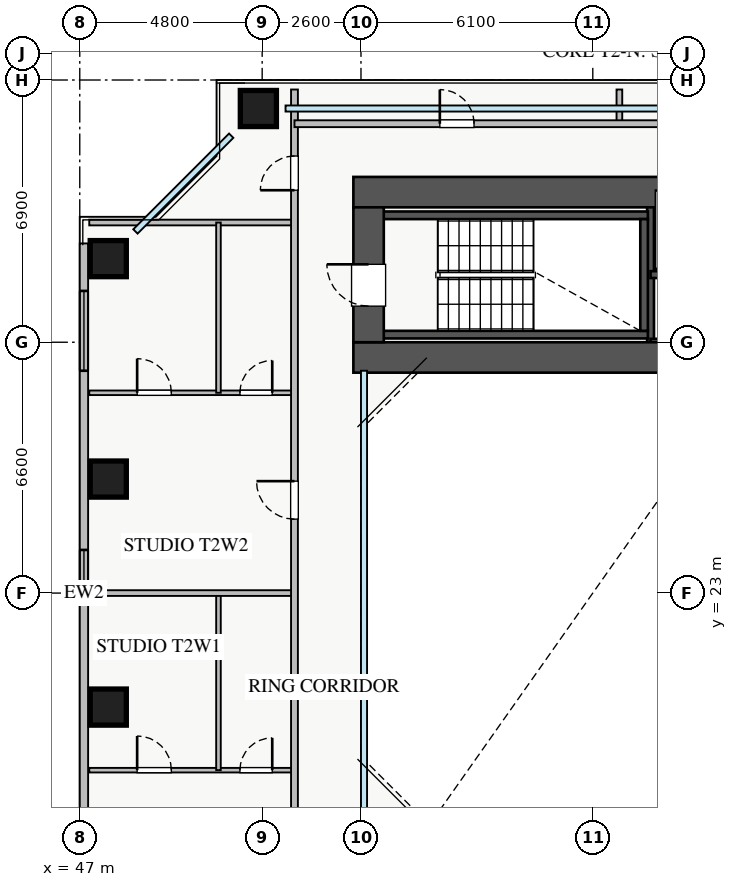
"""IFC4 building model, lengths in metres.
Left out: names, types, materials, properties, quantities, classifications, styles, units other than length and angle.
Written with IfcOpenShell. Run it as: python <this file> out.ifc"""

import sys

from ifc_helpers import new_model, si_unit, direction, frame, frame_2d, origin, origin_2d, place, context, subcontext, project, spatial, rectangle, extrude, source, transform, mapped, element, fill, save


model = new_model("IFC4")
c1 = context("Model", 3, precision=1e-05, world=origin(), true_north=direction((0.0, 1.0)))
c2 = subcontext(c1, "Body", "Model", "MODEL_VIEW")
j1 = project(units=[si_unit("LENGTHUNIT", "METRE"), si_unit("PLANEANGLEUNIT", "RADIAN")], contexts=[c1])
p1 = place(None, origin())
s1 = spatial("IfcSite", under=j1, at=p1, CompositionType="ELEMENT")
p2 = place(p1, origin())
s2 = spatial("IfcBuilding", under=s1, at=p2, CompositionType="ELEMENT")
p3 = place(p2, frame((0.0, 0.0, 36.0)))
s3 = spatial("IfcBuildingStorey", under=s2, at=p3, CompositionType="ELEMENT", Elevation=36.0)
p4 = place(p3, frame((62.02, 29.6, 0.0), z_axis=(0.0, 0.0, 1.0), x_axis=(0.0, 1.0, 0.0)))
e1 = element("IfcWall", 1, at=p4, inside=s3, PredefinedType="SHEAR", context=c2, shape_type="SweptSolid", body=[
    extrude(rectangle(XDim=3.95, YDim=0.18, at=frame_2d((1.975, 0.0))), origin(), (0.0, 0.0, 1.0), 3.07),
])
for number, where, z_axis, x_axis in (
    (2, (62.02, 31.38, 0.0), (0.0, 0.0, 1.0), (1.0, 0.0, 0.0)),
    (3, (62.02, 29.6, 0.0), (0.0, 0.0, 1.0), (1.0, 0.0, 0.0)),
):
    element("IfcWall", number, at=place(p3, frame(where, z_axis=z_axis, x_axis=x_axis)), inside=s3, PredefinedType="SHEAR", context=c2, shape_type="SweptSolid", body=[
        extrude(rectangle(XDim=1.86, YDim=0.18, at=frame_2d((0.93, 0.0))), origin(), (0.0, 0.0, 1.0), 3.07),
    ])
for number, where, z_axis, x_axis in (
    (4, (54.8, 29.8, 0.0), (0.0, 0.0, 1.0), (1.0, 0.0, 0.0)),
    (5, (54.8, 32.94, 0.0), (0.0, 0.0, 1.0), (1.0, 0.0, 0.0)),
):
    element("IfcWall", number, at=place(p3, frame(where, z_axis=z_axis, x_axis=x_axis)), inside=s3, PredefinedType="SHEAR", context=c2, shape_type="SweptSolid", body=[
        extrude(rectangle(XDim=7.15, YDim=0.2, at=frame_2d((3.575, 0.0))), origin(), (0.0, 0.0, 1.0), 3.25),
    ])
p5 = place(p3, frame((61.85, 29.9, 0.0), z_axis=(0.0, 0.0, 1.0), x_axis=(0.0, 1.0, 0.0)))
e6 = element("IfcWall", 6, at=p5, inside=s3, PredefinedType="SHEAR", context=c2, shape_type="SweptSolid", body=[
    extrude(rectangle(XDim=2.94, YDim=0.2, at=frame_2d((1.47, 0.0))), origin(), (0.0, 0.0, 1.0), 3.25),
])
p6 = place(p3, frame((54.2, 29.2, 0.0), z_axis=(0.0, 0.0, 1.0), x_axis=(1.0, 0.0, 0.0)))
e7 = element("IfcWall", 7, at=p6, inside=s3, PredefinedType="SHEAR", context=c2, shape_type="SweptSolid", body=[
    extrude(rectangle(XDim=12.6, YDim=0.8, at=frame_2d((6.3, 0.0))), origin(), (0.0, 0.0, 1.0), 3.25),
])
p7 = place(p3, frame((54.2, 33.55, 0.0), z_axis=(0.0, 0.0, 1.0), x_axis=(1.0, 0.0, 0.0)))
e8 = element("IfcWall", 8, at=p7, inside=s3, PredefinedType="SHEAR", context=c2, shape_type="SweptSolid", body=[
    extrude(rectangle(XDim=12.6, YDim=0.8, at=frame_2d((6.3, 0.0))), origin(), (0.0, 0.0, 1.0), 3.25),
])
p8 = place(p7, frame((8.2, 0.0, 0.0)))
e9 = element("IfcOpeningElement", 9, at=p8, cuts=e8, PredefinedType="OPENING", context=c2, shape_type="SweptSolid", body=[
    extrude(rectangle(XDim=1.1, YDim=2.05, at=frame_2d((0.55, 1.025))), frame((0.0, 0.41, 0.0), z_axis=(0.0, -1.0, 0.0), x_axis=(1.0, 0.0, 0.0)), (0.0, 0.0, 1.0), 0.82),
])
p9 = place(p3, frame((54.6, 29.6, 0.0), z_axis=(0.0, 0.0, 1.0), x_axis=(0.0, 1.0, 0.0)))
e10 = element("IfcWall", 10, at=p9, inside=s3, PredefinedType="SHEAR", context=c2, shape_type="SweptSolid", body=[
    extrude(rectangle(XDim=3.55, YDim=0.8, at=frame_2d((1.775, 0.0))), origin(), (0.0, 0.0, 1.0), 3.25),
])
p10 = place(p9, frame((0.95, 0.0, 0.0)))
e11 = element("IfcOpeningElement", 11, at=p10, cuts=e10, PredefinedType="OPENING", context=c2, shape_type="SweptSolid", body=[
    extrude(rectangle(XDim=1.1, YDim=2.05, at=frame_2d((0.55, 1.025))), frame((0.0, 0.41, 0.0), z_axis=(0.0, -1.0, 0.0), x_axis=(1.0, 0.0, 0.0)), (0.0, 0.0, 1.0), 0.82),
])
m1 = source(origin(), c2, "Body", "SweptSolid", [
    extrude(rectangle(XDim=0.95, YDim=0.95, at=origin_2d()), origin(), (0.0, 0.0, 1.0), 3.25),
])
for number, where, z_axis, x_axis in (
    (12, (51.7, 35.75, 0.0), (0.0, 0.0, 1.0), (1.0, 0.0, 0.0)),
    (13, (47.75, 20.0, 0.0), (0.0, 0.0, 1.0), (1.0, 0.0, 0.0)),
    (14, (47.75, 26.0, 0.0), (0.0, 0.0, 1.0), (1.0, 0.0, 0.0)),
    (15, (47.75, 31.8, 0.0), (0.0, 0.0, 1.0), (1.0, 0.0, 0.0)),
):
    element("IfcColumn", number, at=place(p3, frame(where, z_axis=z_axis, x_axis=x_axis)), inside=s3, PredefinedType="COLUMN", context=c2, shape_type="MappedRepresentation", body=[
        mapped(m1, transform((0.0, 0.0, 0.0), x_axis=(1.0, 0.0, 0.0), y_axis=(0.0, 1.0, 0.0), z_axis=(0.0, 0.0, 1.0), scale=1.0)),
    ])
p11 = place(p3, frame((47.11, 13.8, 0.0), z_axis=(0.0, 0.0, 1.0), x_axis=(0.0, 1.0, 0.0)))
e16 = element("IfcWall", 16, at=p11, inside=s3, PredefinedType="STANDARD", context=c2, shape_type="SweptSolid", body=[
    extrude(rectangle(XDim=18.4, YDim=0.22, at=frame_2d((9.2, 0.0))), origin(), (0.0, 0.0, 1.0), 2.61),
])
p12 = place(p11, frame((1.1, 0.0, 0.9)))
e17 = element("IfcOpeningElement", 17, at=p12, cuts=e16, PredefinedType="OPENING", context=c2, shape_type="SweptSolid", body=[
    extrude(rectangle(XDim=2.4, YDim=1.48, at=frame_2d((1.2, 0.74))), frame((0.0, 0.12, 0.0), z_axis=(0.0, -1.0, 0.0), x_axis=(1.0, 0.0, 0.0)), (0.0, 0.0, 1.0), 0.24),
])
p13 = place(p11, frame((15.05, 0.0, 0.9)))
e18 = element("IfcOpeningElement", 18, at=p13, cuts=e16, PredefinedType="OPENING", context=c2, shape_type="SweptSolid", body=[
    extrude(rectangle(XDim=2.1, YDim=1.48, at=frame_2d((1.05, 0.74))), frame((0.0, 0.12, 0.0), z_axis=(0.0, -1.0, 0.0), x_axis=(1.0, 0.0, 0.0)), (0.0, 0.0, 1.0), 0.24),
])
p14 = place(p11, frame((9.435, 0.0, 0.9)))
e19 = element("IfcOpeningElement", 19, at=p14, cuts=e16, PredefinedType="OPENING", context=c2, shape_type="SweptSolid", body=[
    extrude(rectangle(XDim=0.9, YDim=1.2, at=frame_2d((0.45, 0.6))), frame((0.0, 0.12, 0.0), z_axis=(0.0, -1.0, 0.0), x_axis=(1.0, 0.0, 0.0)), (0.0, 0.0, 1.0), 0.24),
])
p15 = place(p3, frame((47.25, 32.75, 0.0), z_axis=(0.0, 0.0, 1.0), x_axis=(1.0, 0.0, 0.0)))
e20 = element("IfcWall", 20, at=p15, inside=s3, PredefinedType="PARTITIONING", context=c2, shape_type="SweptSolid", body=[
    extrude(rectangle(XDim=5.4, YDim=0.15, at=frame_2d((2.7, 0.0))), origin(), (0.0, 0.0, 1.0), 3.07),
])
p16 = place(p3, frame((47.25, 18.34, 0.0), z_axis=(0.0, 0.0, 1.0), x_axis=(1.0, 0.0, 0.0)))
e21 = element("IfcWall", 21, at=p16, inside=s3, PredefinedType="PLUMBINGWALL", context=c2, shape_type="SweptSolid", body=[
    extrude(rectangle(XDim=5.4, YDim=0.12, at=frame_2d((2.7, 0.0))), origin(), (0.0, 0.0, 1.0), 2.715),
])
p17 = place(p16, frame((1.26, 0.0, 0.0)))
e22 = element("IfcOpeningElement", 22, at=p17, cuts=e21, PredefinedType="OPENING", context=c2, shape_type="SweptSolid", body=[
    extrude(rectangle(XDim=0.9, YDim=2.05, at=frame_2d((0.45, 1.025))), frame((0.0, 0.07, 0.0), z_axis=(0.0, -1.0, 0.0), x_axis=(1.0, 0.0, 0.0)), (0.0, 0.0, 1.0), 0.14),
])
p18 = place(p16, frame((3.965, 0.0, 0.0)))
e23 = element("IfcOpeningElement", 23, at=p18, cuts=e21, PredefinedType="OPENING", context=c2, shape_type="SweptSolid", body=[
    extrude(rectangle(XDim=0.85, YDim=2.05, at=frame_2d((0.425, 1.025))), frame((0.0, 0.07, 0.0), z_axis=(0.0, -1.0, 0.0), x_axis=(1.0, 0.0, 0.0)), (0.0, 0.0, 1.0), 0.14),
])
p19 = place(p3, frame((50.65, 18.34, 0.0), z_axis=(0.0, 0.0, 1.0), x_axis=(0.0, 1.0, 0.0)))
e24 = element("IfcWall", 24, at=p19, inside=s3, PredefinedType="PLUMBINGWALL", context=c2, shape_type="SweptSolid", body=[
    extrude(rectangle(XDim=4.66, YDim=0.12, at=frame_2d((2.33, 0.0))), origin(), (0.0, 0.0, 1.0), 3.07),
])
p20 = place(p3, frame((47.25, 28.27, 0.0), z_axis=(0.0, 0.0, 1.0), x_axis=(1.0, 0.0, 0.0)))
e25 = element("IfcWall", 25, at=p20, inside=s3, PredefinedType="PLUMBINGWALL", context=c2, shape_type="SweptSolid", body=[
    extrude(rectangle(XDim=5.4, YDim=0.12, at=frame_2d((2.7, 0.0))), origin(), (0.0, 0.0, 1.0), 3.07),
])
p21 = place(p20, frame((1.26, 0.0, 0.0)))
e26 = element("IfcOpeningElement", 26, at=p21, cuts=e25, PredefinedType="OPENING", context=c2, shape_type="SweptSolid", body=[
    extrude(rectangle(XDim=0.9, YDim=2.05, at=frame_2d((0.45, 1.025))), frame((0.0, 0.07, 0.0), z_axis=(0.0, -1.0, 0.0), x_axis=(1.0, 0.0, 0.0)), (0.0, 0.0, 1.0), 0.14),
])
p22 = place(p20, frame((3.965, 0.0, 0.0)))
e27 = element("IfcOpeningElement", 27, at=p22, cuts=e25, PredefinedType="OPENING", context=c2, shape_type="SweptSolid", body=[
    extrude(rectangle(XDim=0.85, YDim=2.05, at=frame_2d((0.425, 1.025))), frame((0.0, 0.07, 0.0), z_axis=(0.0, -1.0, 0.0), x_axis=(1.0, 0.0, 0.0)), (0.0, 0.0, 1.0), 0.14),
])
p23 = place(p3, frame((50.65, 28.27, 0.0), z_axis=(0.0, 0.0, 1.0), x_axis=(0.0, 1.0, 0.0)))
e28 = element("IfcWall", 28, at=p23, inside=s3, PredefinedType="PLUMBINGWALL", context=c2, shape_type="SweptSolid", body=[
    extrude(rectangle(XDim=4.48, YDim=0.12, at=frame_2d((2.24, 0.0))), origin(), (0.0, 0.0, 1.0), 3.07),
])
p24 = place(p3, frame((47.25, 23.0, 0.0), z_axis=(0.0, 0.0, 1.0), x_axis=(1.0, 0.0, 0.0)))
e29 = element("IfcWall", 29, at=p24, inside=s3, PredefinedType="PARTITIONING", context=c2, shape_type="SweptSolid", body=[
    extrude(rectangle(XDim=5.4, YDim=0.15, at=frame_2d((2.7, 0.0))), origin(), (0.0, 0.0, 1.0), 2.715),
])
p25 = place(p3, frame((52.65, 9.75, 0.0), z_axis=(0.0, 0.0, 1.0), x_axis=(0.0, 1.0, 0.0)))
e30 = element("IfcWall", 30, at=p25, inside=s3, PredefinedType="PARTITIONING", context=c2, shape_type="SweptSolid", body=[
    extrude(rectangle(XDim=26.5, YDim=0.18, at=frame_2d((13.25, 0.0))), origin(), (0.0, 0.0, 1.0), 3.07),
])
p26 = place(p25, frame((23.85, 0.0, 0.0)))
e31 = element("IfcOpeningElement", 31, at=p26, cuts=e30, PredefinedType="OPENING", context=c2, shape_type="SweptSolid", body=[
    extrude(rectangle(XDim=0.9, YDim=2.05, at=frame_2d((0.45, 1.025))), frame((0.0, 0.1, 0.0), z_axis=(0.0, -1.0, 0.0), x_axis=(1.0, 0.0, 0.0)), (0.0, 0.0, 1.0), 0.2),
])
p27 = place(p25, frame((1.75, 0.0, 0.0)))
e32 = element("IfcOpeningElement", 32, at=p27, cuts=e30, PredefinedType="OPENING", context=c2, shape_type="SweptSolid", body=[
    extrude(rectangle(XDim=0.9, YDim=2.05, at=frame_2d((0.45, 1.025))), frame((0.0, 0.1, 0.0), z_axis=(0.0, -1.0, 0.0), x_axis=(1.0, 0.0, 0.0)), (0.0, 0.0, 1.0), 0.2),
])
p28 = place(p25, frame((5.355, 0.0, 0.0)))
e33 = element("IfcOpeningElement", 33, at=p28, cuts=e30, PredefinedType="OPENING", context=c2, shape_type="SweptSolid", body=[
    extrude(rectangle(XDim=1.0, YDim=2.05, at=frame_2d((0.5, 1.025))), frame((0.0, 0.1, 0.0), z_axis=(0.0, -1.0, 0.0), x_axis=(1.0, 0.0, 0.0)), (0.0, 0.0, 1.0), 0.2),
])
p29 = place(p25, frame((15.195, 0.0, 0.0)))
e34 = element("IfcOpeningElement", 34, at=p29, cuts=e30, PredefinedType="OPENING", context=c2, shape_type="SweptSolid", body=[
    extrude(rectangle(XDim=1.0, YDim=2.05, at=frame_2d((0.5, 1.025))), frame((0.0, 0.1, 0.0), z_axis=(0.0, -1.0, 0.0), x_axis=(1.0, 0.0, 0.0)), (0.0, 0.0, 1.0), 0.2),
])
p30 = place(p3, frame((61.2, 35.35, 0.0), z_axis=(0.0, 0.0, 1.0), x_axis=(0.0, 1.0, 0.0)))
e35 = element("IfcWall", 35, at=p30, inside=s3, PredefinedType="PARTITIONING", context=c2, shape_type="SweptSolid", body=[
    extrude(rectangle(XDim=0.9, YDim=0.15, at=frame_2d((0.45, 0.0))), origin(), (0.0, 0.0, 1.0), 3.07),
])
p31 = place(p3, frame((52.65, 35.35, 0.0), z_axis=(0.0, 0.0, 1.0), x_axis=(1.0, 0.0, 0.0)))
e36 = element("IfcWall", 36, at=p31, inside=s3, PredefinedType="PARTITIONING", context=c2, shape_type="SweptSolid", body=[
    extrude(rectangle(XDim=17.0, YDim=0.18, at=frame_2d((8.5, 0.0))), origin(), (0.0, 0.0, 1.0), 3.07),
])
p32 = place(p31, frame((3.825, 0.0, 0.0)))
e37 = element("IfcOpeningElement", 37, at=p32, cuts=e36, PredefinedType="OPENING", context=c2, shape_type="SweptSolid", body=[
    extrude(rectangle(XDim=0.9, YDim=2.05, at=frame_2d((0.45, 1.025))), frame((0.0, 0.1, 0.0), z_axis=(0.0, -1.0, 0.0), x_axis=(1.0, 0.0, 0.0)), (0.0, 0.0, 1.0), 0.2),
])
p33 = place(p31, frame((12.325, 0.0, 0.0)))
e38 = element("IfcOpeningElement", 38, at=p33, cuts=e36, PredefinedType="OPENING", context=c2, shape_type="SweptSolid", body=[
    extrude(rectangle(XDim=0.9, YDim=2.05, at=frame_2d((0.45, 1.025))), frame((0.0, 0.1, 0.0), z_axis=(0.0, -1.0, 0.0), x_axis=(1.0, 0.0, 0.0)), (0.0, 0.0, 1.0), 0.2),
])
m2 = source(origin(), c2, "Body", "SweptSolid", [
    extrude(rectangle(XDim=2.1, YDim=1.48, at=frame_2d((1.05, 0.74))), frame((0.0, 0.03, 0.0), z_axis=(0.0, -1.0, 0.0), x_axis=(1.0, 0.0, 0.0)), (0.0, 0.0, 1.0), 0.06),
])
p34 = place(p13, origin())
e39 = element("IfcWindow", 39, at=p34, inside=s3, PartitioningType="TRIPLE_PANEL_VERTICAL", PredefinedType="WINDOW", context=c2, shape_type="MappedRepresentation", body=[
    mapped(m2, transform((0.0, 0.0, 0.0), x_axis=(1.0, 0.0, 0.0), y_axis=(0.0, 1.0, 0.0), z_axis=(0.0, 0.0, 1.0), scale=1.0)),
])
fill(e18, e39)
m3 = source(origin(), c2, "Body", "SweptSolid", [
    extrude(rectangle(XDim=1.1, YDim=2.05, at=frame_2d((0.55, 1.025))), frame((0.0, 0.025, 0.0), z_axis=(0.0, -1.0, 0.0), x_axis=(1.0, 0.0, 0.0)), (0.0, 0.0, 1.0), 0.05),
])
p35 = place(p10, origin())
e40 = element("IfcDoor", 40, at=p35, inside=s3, OperationType="SINGLE_SWING_RIGHT", PredefinedType="DOOR", context=c2, shape_type="MappedRepresentation", body=[
    mapped(m3, transform((0.0, 0.0, 0.0), x_axis=(1.0, 0.0, 0.0), y_axis=(0.0, 1.0, 0.0), z_axis=(0.0, 0.0, 1.0), scale=1.0)),
])
fill(e11, e40)
m4 = source(origin(), c2, "Body", "SweptSolid", [
    extrude(rectangle(XDim=0.9, YDim=2.05, at=frame_2d((0.45, 1.025))), frame((0.0, 0.025, 0.0), z_axis=(0.0, -1.0, 0.0), x_axis=(1.0, 0.0, 0.0)), (0.0, 0.0, 1.0), 0.05),
])
p36 = place(p17, origin())
e41 = element("IfcDoor", 41, at=p36, inside=s3, OperationType="SINGLE_SWING_LEFT", PredefinedType="DOOR", context=c2, shape_type="MappedRepresentation", body=[
    mapped(m4, transform((0.0, 0.0, 0.0), x_axis=(1.0, 0.0, 0.0), y_axis=(0.0, 1.0, 0.0), z_axis=(0.0, 0.0, 1.0), scale=1.0)),
])
fill(e22, e41)
m5 = source(origin(), c2, "Body", "SweptSolid", [
    extrude(rectangle(XDim=0.85, YDim=2.05, at=frame_2d((0.425, 1.025))), frame((0.0, 0.025, 0.0), z_axis=(0.0, -1.0, 0.0), x_axis=(1.0, 0.0, 0.0)), (0.0, 0.0, 1.0), 0.05),
])
p37 = place(p18, origin())
e42 = element("IfcDoor", 42, at=p37, inside=s3, OperationType="SINGLE_SWING_RIGHT", PredefinedType="DOOR", context=c2, shape_type="MappedRepresentation", body=[
    mapped(m5, transform((0.0, 0.0, 0.0), x_axis=(1.0, 0.0, 0.0), y_axis=(0.0, 1.0, 0.0), z_axis=(0.0, 0.0, 1.0), scale=1.0)),
])
fill(e23, e42)
p38 = place(p21, origin())
e43 = element("IfcDoor", 43, at=p38, inside=s3, OperationType="SINGLE_SWING_LEFT", PredefinedType="DOOR", context=c2, shape_type="MappedRepresentation", body=[
    mapped(m4, transform((0.0, 0.0, 0.0), x_axis=(1.0, 0.0, 0.0), y_axis=(0.0, 1.0, 0.0), z_axis=(0.0, 0.0, 1.0), scale=1.0)),
])
fill(e26, e43)
p39 = place(p22, origin())
e44 = element("IfcDoor", 44, at=p39, inside=s3, OperationType="SINGLE_SWING_RIGHT", PredefinedType="DOOR", context=c2, shape_type="MappedRepresentation", body=[
    mapped(m5, transform((0.0, 0.0, 0.0), x_axis=(1.0, 0.0, 0.0), y_axis=(0.0, 1.0, 0.0), z_axis=(0.0, 0.0, 1.0), scale=1.0)),
])
fill(e27, e44)
p40 = place(p26, origin())
e45 = element("IfcDoor", 45, at=p40, inside=s3, OperationType="SINGLE_SWING_LEFT", PredefinedType="DOOR", context=c2, shape_type="MappedRepresentation", body=[
    mapped(m4, transform((0.0, 0.0, 0.0), x_axis=(1.0, 0.0, 0.0), y_axis=(0.0, 1.0, 0.0), z_axis=(0.0, 0.0, 1.0), scale=1.0)),
])
fill(e31, e45)
m6 = source(origin(), c2, "Body", "SweptSolid", [
    extrude(rectangle(XDim=1.0, YDim=2.05, at=frame_2d((0.5, 1.025))), frame((0.0, 0.025, 0.0), z_axis=(0.0, -1.0, 0.0), x_axis=(1.0, 0.0, 0.0)), (0.0, 0.0, 1.0), 0.05),
])
p41 = place(p29, origin())
e46 = element("IfcDoor", 46, at=p41, inside=s3, OperationType="SINGLE_SWING_RIGHT", PredefinedType="DOOR", context=c2, shape_type="MappedRepresentation", body=[
    mapped(m6, transform((0.0, 0.0, 0.0), x_axis=(1.0, 0.0, 0.0), y_axis=(0.0, 1.0, 0.0), z_axis=(0.0, 0.0, 1.0), scale=1.0)),
])
fill(e34, e46)
p42 = place(p32, origin())
e47 = element("IfcDoor", 47, at=p42, inside=s3, OperationType="SINGLE_SWING_LEFT", PredefinedType="DOOR", context=c2, shape_type="MappedRepresentation", body=[
    mapped(m4, transform((0.0, 0.0, 0.0), x_axis=(1.0, 0.0, 0.0), y_axis=(0.0, 1.0, 0.0), z_axis=(0.0, 0.0, 1.0), scale=1.0)),
])
fill(e37, e47)
m7 = source(origin(), c2, "Body", "SweptSolid", [
    extrude(rectangle(XDim=0.9, YDim=1.2, at=frame_2d((0.45, 0.6))), frame((0.0, 0.03, 0.0), z_axis=(0.0, -1.0, 0.0), x_axis=(1.0, 0.0, 0.0)), (0.0, 0.0, 1.0), 0.06),
])
p43 = place(p14, origin())
e48 = element("IfcWindow", 48, at=p43, inside=s3, PartitioningType="SINGLE_PANEL", PredefinedType="WINDOW", context=c2, shape_type="MappedRepresentation", body=[
    mapped(m7, transform((0.0, 0.0, 0.0), x_axis=(1.0, 0.0, 0.0), y_axis=(0.0, 1.0, 0.0), z_axis=(0.0, 0.0, 1.0), scale=1.0)),
])
fill(e19, e48)
save(model, sys.argv[1])
